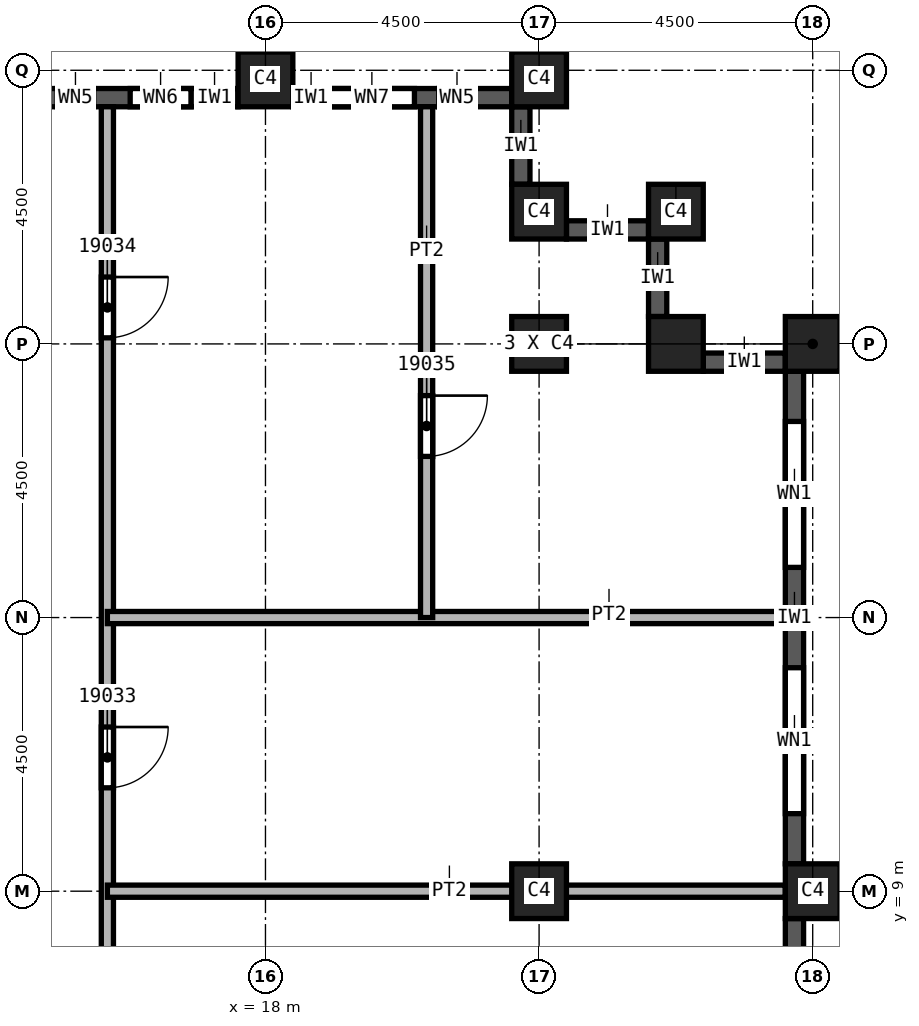
"""IFC4 building model, lengths in metres.
Left out: names, types, materials, properties, quantities, classifications, styles, units other than length and angle.
Written with IfcOpenShell. Run it as: python <this file> out.ifc"""

import sys

from ifc_helpers import new_model, si_unit, direction, frame, frame_2d, origin, origin_2d, place, context, subcontext, project, spatial, rectangle, extrude, element, fill, save


model = new_model("IFC4")
c1 = context("Model", 3, precision=1e-05, world=origin(), true_north=direction((0.0, 1.0)))
c2 = subcontext(c1, "Body", "Model", "MODEL_VIEW")
j1 = project(units=[si_unit("LENGTHUNIT", "METRE"), si_unit("PLANEANGLEUNIT", "RADIAN")], contexts=[c1])
p1 = place(None, origin())
s1 = spatial("IfcSite", under=j1, at=p1, CompositionType="ELEMENT")
p2 = place(p1, origin())
s2 = spatial("IfcBuilding", under=s1, at=p2, CompositionType="ELEMENT")
p3 = place(p2, frame((0.0, 0.0, 282.0)))
s3 = spatial("IfcBuildingStorey", under=s2, at=p3, CompositionType="ELEMENT", Elevation=282.0)
for number, where, z_axis, x_axis in (
    (1, (22.5, 9.0, 0.0), (0.0, 0.0, 1.0), (1.0, 0.0, 0.0)),
    (2, (22.5, 18.0, 0.0), (0.0, 0.0, 1.0), (1.0, 0.0, 0.0)),
    (3, (27.0, 9.0, 0.0), (0.0, 0.0, 1.0), (0.0, 1.0, 0.0)),
    (4, (27.0, 18.0, 0.0), (0.0, 0.0, 1.0), (0.0, 1.0, 0.0)),
    (5, (18.0, 22.35, 0.0), (0.0, 0.0, 1.0), (1.0, 0.0, 0.0)),
    (6, (22.5, 22.35, 0.0), (0.0, 0.0, 1.0), (1.0, 0.0, 0.0)),
    (7, (22.5, 20.175, 0.0), (0.0, 0.0, 1.0), (1.0, 0.0, 0.0)),
    (8, (24.75, 20.175, 0.0), (0.0, 0.0, 1.0), (1.0, 0.0, 0.0)),
    (9, (24.75, 18.0, 0.0), (0.0, 0.0, 1.0), (1.0, 0.0, 0.0)),
):
    element("IfcColumn", number, at=place(p3, frame(where, z_axis=z_axis, x_axis=x_axis)), inside=s3, PredefinedType="COLUMN", context=c2, shape_type="SweptSolid", body=[
        extrude(rectangle(XDim=0.9, YDim=0.9, at=origin_2d()), origin(), (0.0, 0.0, 1.0), 3.72),
    ])
p4 = place(p3, frame((26.7, 0.45, 0.0), z_axis=(0.0, 0.0, 1.0), x_axis=(0.0, 1.0, 0.0)))
e10 = element("IfcWall", 10, at=p4, inside=s3, PredefinedType="SOLIDWALL", context=c2, shape_type="SweptSolid", body=[
    extrude(rectangle(XDim=8.1, YDim=0.3, at=frame_2d((4.05, 0.0))), origin(), (0.0, 0.0, 1.0), 3.12),
])
p5 = place(p4, frame((0.825, 0.0, 0.8)))
e11 = element("IfcOpeningElement", 11, at=p5, cuts=e10, PredefinedType="OPENING", context=c2, shape_type="SweptSolid", body=[
    extrude(rectangle(XDim=2.4, YDim=1.95, at=frame_2d((1.2, 0.975))), frame((0.0, 0.15, 0.0), z_axis=(0.0, -1.0, 0.0), x_axis=(1.0, 0.0, 0.0)), (0.0, 0.0, 1.0), 0.3),
])
p6 = place(p4, frame((4.875, 0.0, 0.8)))
e12 = element("IfcOpeningElement", 12, at=p6, cuts=e10, PredefinedType="OPENING", context=c2, shape_type="SweptSolid", body=[
    extrude(rectangle(XDim=2.4, YDim=1.95, at=frame_2d((1.2, 0.975))), frame((0.0, 0.15, 0.0), z_axis=(0.0, -1.0, 0.0), x_axis=(1.0, 0.0, 0.0)), (0.0, 0.0, 1.0), 0.3),
])
p7 = place(p3, frame((26.7, 9.45, 0.0), z_axis=(0.0, 0.0, 1.0), x_axis=(0.0, 1.0, 0.0)))
e13 = element("IfcWall", 13, at=p7, inside=s3, PredefinedType="SOLIDWALL", context=c2, shape_type="SweptSolid", body=[
    extrude(rectangle(XDim=8.1, YDim=0.3, at=frame_2d((4.05, 0.0))), origin(), (0.0, 0.0, 1.0), 3.12),
])
p8 = place(p7, frame((0.825, 0.0, 0.8)))
e14 = element("IfcOpeningElement", 14, at=p8, cuts=e13, PredefinedType="OPENING", context=c2, shape_type="SweptSolid", body=[
    extrude(rectangle(XDim=2.4, YDim=1.95, at=frame_2d((1.2, 0.975))), frame((0.0, 0.15, 0.0), z_axis=(0.0, -1.0, 0.0), x_axis=(1.0, 0.0, 0.0)), (0.0, 0.0, 1.0), 0.3),
])
p9 = place(p7, frame((4.875, 0.0, 0.8)))
e15 = element("IfcOpeningElement", 15, at=p9, cuts=e13, PredefinedType="OPENING", context=c2, shape_type="SweptSolid", body=[
    extrude(rectangle(XDim=2.4, YDim=1.95, at=frame_2d((1.2, 0.975))), frame((0.0, 0.15, 0.0), z_axis=(0.0, -1.0, 0.0), x_axis=(1.0, 0.0, 0.0)), (0.0, 0.0, 1.0), 0.3),
])
p10 = place(p3, frame((26.55, 17.7, 0.0), z_axis=(0.0, 0.0, 1.0), x_axis=(-1.0, 0.0, 0.0)))
e16 = element("IfcWall", 16, at=p10, inside=s3, PredefinedType="SOLIDWALL", context=c2, shape_type="SweptSolid", body=[
    extrude(rectangle(XDim=1.35, YDim=0.3, at=frame_2d((0.675, 0.0))), origin(), (0.0, 0.0, 1.0), 3.12),
])
p11 = place(p3, frame((24.45, 18.45, 0.0), z_axis=(0.0, 0.0, 1.0), x_axis=(0.0, 1.0, 0.0)))
e17 = element("IfcWall", 17, at=p11, inside=s3, PredefinedType="SOLIDWALL", context=c2, shape_type="SweptSolid", body=[
    extrude(rectangle(XDim=1.275, YDim=0.3, at=frame_2d((0.638, 0.0))), origin(), (0.0, 0.0, 1.0), 3.12),
])
p12 = place(p3, frame((24.3, 19.875, 0.0), z_axis=(0.0, 0.0, 1.0), x_axis=(-1.0, 0.0, 0.0)))
e18 = element("IfcWall", 18, at=p12, inside=s3, PredefinedType="SOLIDWALL", context=c2, shape_type="SweptSolid", body=[
    extrude(rectangle(XDim=1.35, YDim=0.3, at=frame_2d((0.675, 0.0))), origin(), (0.0, 0.0, 1.0), 3.12),
])
p13 = place(p3, frame((22.2, 20.625, 0.0), z_axis=(0.0, 0.0, 1.0), x_axis=(0.0, 1.0, 0.0)))
e19 = element("IfcWall", 19, at=p13, inside=s3, PredefinedType="SOLIDWALL", context=c2, shape_type="SweptSolid", body=[
    extrude(rectangle(XDim=1.275, YDim=0.3, at=frame_2d((0.637, 0.0))), origin(), (0.0, 0.0, 1.0), 3.12),
])
p14 = place(p3, frame((22.05, 22.05, 0.0), z_axis=(0.0, 0.0, 1.0), x_axis=(-1.0, 0.0, 0.0)))
e20 = element("IfcWall", 20, at=p14, inside=s3, PredefinedType="SOLIDWALL", context=c2, shape_type="SweptSolid", body=[
    extrude(rectangle(XDim=3.6, YDim=0.3, at=frame_2d((1.8, 0.0))), origin(), (0.0, 0.0, 1.0), 3.12),
])
p15 = place(p14, frame((0.6, 0.0, 0.8)))
e21 = element("IfcOpeningElement", 21, at=p15, cuts=e20, PredefinedType="OPENING", context=c2, shape_type="SweptSolid", body=[
    extrude(rectangle(XDim=0.6, YDim=1.95, at=frame_2d((0.3, 0.975))), frame((0.0, 0.15, 0.0), z_axis=(0.0, -1.0, 0.0), x_axis=(1.0, 0.0, 0.0)), (0.0, 0.0, 1.0), 0.3),
])
p16 = place(p14, frame((1.6, 0.0, 0.8)))
e22 = element("IfcOpeningElement", 22, at=p16, cuts=e20, PredefinedType="OPENING", context=c2, shape_type="SweptSolid", body=[
    extrude(rectangle(XDim=1.4, YDim=1.95, at=frame_2d((0.7, 0.975))), frame((0.0, 0.15, 0.0), z_axis=(0.0, -1.0, 0.0), x_axis=(1.0, 0.0, 0.0)), (0.0, 0.0, 1.0), 0.3),
])
p17 = place(p3, frame((17.55, 22.05, 0.0), z_axis=(0.0, 0.0, 1.0), x_axis=(-1.0, 0.0, 0.0)))
e23 = element("IfcWall", 23, at=p17, inside=s3, PredefinedType="SOLIDWALL", context=c2, shape_type="SweptSolid", body=[
    extrude(rectangle(XDim=3.6, YDim=0.3, at=frame_2d((1.8, 0.0))), origin(), (0.0, 0.0, 1.0), 3.12),
])
p18 = place(p17, frame((0.775, 0.0, 0.8)))
e24 = element("IfcOpeningElement", 24, at=p18, cuts=e23, PredefinedType="OPENING", context=c2, shape_type="SweptSolid", body=[
    extrude(rectangle(XDim=1.0, YDim=1.95, at=frame_2d((0.5, 0.975))), frame((0.0, 0.15, 0.0), z_axis=(0.0, -1.0, 0.0), x_axis=(1.0, 0.0, 0.0)), (0.0, 0.0, 1.0), 0.3),
])
p19 = place(p17, frame((2.375, 0.0, 0.8)))
e25 = element("IfcOpeningElement", 25, at=p19, cuts=e23, PredefinedType="OPENING", context=c2, shape_type="SweptSolid", body=[
    extrude(rectangle(XDim=0.6, YDim=1.95, at=frame_2d((0.3, 0.975))), frame((0.0, 0.15, 0.0), z_axis=(0.0, -1.0, 0.0), x_axis=(1.0, 0.0, 0.0)), (0.0, 0.0, 1.0), 0.3),
])
p20 = place(p3, frame((15.4, 21.9, 0.0), z_axis=(0.0, 0.0, 1.0), x_axis=(0.0, -1.0, 0.0)))
e26 = element("IfcWall", 26, at=p20, inside=s3, PredefinedType="PARTITIONING", context=c2, shape_type="SweptSolid", body=[
    extrude(rectangle(XDim=43.8, YDim=0.2, at=frame_2d((21.9, 0.0))), origin(), (0.0, 0.0, 1.0), 3.72),
])
p21 = place(p20, frame((17.85, 0.0, 0.0)))
e27 = element("IfcOpeningElement", 27, at=p21, cuts=e26, PredefinedType="OPENING", context=c2, shape_type="SweptSolid", body=[
    extrude(rectangle(XDim=1.0, YDim=2.1, at=frame_2d((0.5, 1.05))), frame((0.0, 0.1, 0.0), z_axis=(0.0, -1.0, 0.0), x_axis=(1.0, 0.0, 0.0)), (0.0, 0.0, 1.0), 0.2),
])
p22 = place(p20, frame((10.2, 0.0, 0.0)))
e28 = element("IfcOpeningElement", 28, at=p22, cuts=e26, PredefinedType="OPENING", context=c2, shape_type="SweptSolid", body=[
    extrude(rectangle(XDim=1.0, YDim=2.1, at=frame_2d((0.5, 1.05))), frame((0.0, 0.1, 0.0), z_axis=(0.0, -1.0, 0.0), x_axis=(1.0, 0.0, 0.0)), (0.0, 0.0, 1.0), 0.2),
])
p23 = place(p20, frame((2.8, 0.0, 0.0)))
e29 = element("IfcOpeningElement", 29, at=p23, cuts=e26, PredefinedType="OPENING", context=c2, shape_type="SweptSolid", body=[
    extrude(rectangle(XDim=1.0, YDim=2.1, at=frame_2d((0.5, 1.05))), frame((0.0, 0.1, 0.0), z_axis=(0.0, -1.0, 0.0), x_axis=(1.0, 0.0, 0.0)), (0.0, 0.0, 1.0), 0.2),
])
p24 = place(p20, frame((34.05, 0.0, 0.0)))
e30 = element("IfcOpeningElement", 30, at=p24, cuts=e26, PredefinedType="OPENING", context=c2, shape_type="SweptSolid", body=[
    extrude(rectangle(XDim=1.0, YDim=2.1, at=frame_2d((0.5, 1.05))), frame((0.0, 0.1, 0.0), z_axis=(0.0, -1.0, 0.0), x_axis=(1.0, 0.0, 0.0)), (0.0, 0.0, 1.0), 0.2),
])
p25 = place(p20, frame((27.75, 0.0, 0.0)))
e31 = element("IfcOpeningElement", 31, at=p25, cuts=e26, PredefinedType="OPENING", context=c2, shape_type="SweptSolid", body=[
    extrude(rectangle(XDim=1.0, YDim=2.1, at=frame_2d((0.5, 1.05))), frame((0.0, 0.1, 0.0), z_axis=(0.0, -1.0, 0.0), x_axis=(1.0, 0.0, 0.0)), (0.0, 0.0, 1.0), 0.2),
])
for number, where, z_axis, x_axis in (
    (32, (15.4, 9.0, 0.0), (0.0, 0.0, 1.0), (1.0, 0.0, 0.0)),
    (33, (15.4, 13.5, 0.0), (0.0, 0.0, 1.0), (1.0, 0.0, 0.0)),
):
    element("IfcWall", number, at=place(p3, frame(where, z_axis=z_axis, x_axis=x_axis)), inside=s3, PredefinedType="PARTITIONING", context=c2, shape_type="SweptSolid", body=[
        extrude(rectangle(XDim=11.15, YDim=0.2, at=frame_2d((5.575, 0.0))), origin(), (0.0, 0.0, 1.0), 3.72),
    ])
p26 = place(p3, frame((20.65, 21.9, 0.0), z_axis=(0.0, 0.0, 1.0), x_axis=(0.0, -1.0, 0.0)))
e34 = element("IfcWall", 34, at=p26, inside=s3, PredefinedType="PARTITIONING", context=c2, shape_type="SweptSolid", body=[
    extrude(rectangle(XDim=8.4, YDim=0.2, at=frame_2d((4.2, 0.0))), origin(), (0.0, 0.0, 1.0), 3.72),
])
p27 = place(p26, frame((4.75, 0.0, 0.0)))
e35 = element("IfcOpeningElement", 35, at=p27, cuts=e34, PredefinedType="OPENING", context=c2, shape_type="SweptSolid", body=[
    extrude(rectangle(XDim=1.0, YDim=2.1, at=frame_2d((0.5, 1.05))), frame((0.0, 0.1, 0.0), z_axis=(0.0, -1.0, 0.0), x_axis=(1.0, 0.0, 0.0)), (0.0, 0.0, 1.0), 0.2),
])
p28 = place(p8, origin())
e36 = element("IfcWindow", 36, at=p28, inside=s3, PartitioningType="SINGLE_PANEL", PredefinedType="WINDOW", context=c2, shape_type="SweptSolid", body=[
    extrude(rectangle(XDim=2.4, YDim=1.95, at=frame_2d((1.2, 0.975))), frame((0.0, 0.03, 0.0), z_axis=(0.0, -1.0, 0.0), x_axis=(1.0, 0.0, 0.0)), (0.0, 0.0, 1.0), 0.06),
])
fill(e14, e36)
p29 = place(p9, origin())
e37 = element("IfcWindow", 37, at=p29, inside=s3, PartitioningType="SINGLE_PANEL", PredefinedType="WINDOW", context=c2, shape_type="SweptSolid", body=[
    extrude(rectangle(XDim=2.4, YDim=1.95, at=frame_2d((1.2, 0.975))), frame((0.0, 0.03, 0.0), z_axis=(0.0, -1.0, 0.0), x_axis=(1.0, 0.0, 0.0)), (0.0, 0.0, 1.0), 0.06),
])
fill(e15, e37)
p30 = place(p22, origin())
e38 = element("IfcDoor", 38, at=p30, inside=s3, OperationType="SINGLE_SWING_RIGHT", PredefinedType="DOOR", context=c2, shape_type="SweptSolid", body=[
    extrude(rectangle(XDim=1.0, YDim=2.1, at=frame_2d((0.5, 1.05))), frame((0.0, 0.025, 0.0), z_axis=(0.0, -1.0, 0.0), x_axis=(1.0, 0.0, 0.0)), (0.0, 0.0, 1.0), 0.05),
])
fill(e28, e38)
p31 = place(p23, origin())
e39 = element("IfcDoor", 39, at=p31, inside=s3, OperationType="SINGLE_SWING_LEFT", PredefinedType="DOOR", context=c2, shape_type="SweptSolid", body=[
    extrude(rectangle(XDim=1.0, YDim=2.1, at=frame_2d((0.5, 1.05))), frame((0.0, 0.025, 0.0), z_axis=(0.0, -1.0, 0.0), x_axis=(1.0, 0.0, 0.0)), (0.0, 0.0, 1.0), 0.05),
])
fill(e29, e39)
p32 = place(p27, origin())
e40 = element("IfcDoor", 40, at=p32, inside=s3, OperationType="SINGLE_SWING_RIGHT", PredefinedType="DOOR", context=c2, shape_type="SweptSolid", body=[
    extrude(rectangle(XDim=1.0, YDim=2.1, at=frame_2d((0.5, 1.05))), frame((0.0, 0.025, 0.0), z_axis=(0.0, -1.0, 0.0), x_axis=(1.0, 0.0, 0.0)), (0.0, 0.0, 1.0), 0.05),
])
fill(e35, e40)
p33 = place(p15, origin())
e41 = element("IfcWindow", 41, at=p33, inside=s3, PartitioningType="SINGLE_PANEL", PredefinedType="WINDOW", context=c2, shape_type="SweptSolid", body=[
    extrude(rectangle(XDim=0.6, YDim=1.95, at=frame_2d((0.3, 0.975))), frame((0.0, 0.03, 0.0), z_axis=(0.0, -1.0, 0.0), x_axis=(1.0, 0.0, 0.0)), (0.0, 0.0, 1.0), 0.06),
])
fill(e21, e41)
p34 = place(p16, origin())
e42 = element("IfcWindow", 42, at=p34, inside=s3, PartitioningType="SINGLE_PANEL", PredefinedType="WINDOW", context=c2, shape_type="SweptSolid", body=[
    extrude(rectangle(XDim=1.4, YDim=1.95, at=frame_2d((0.7, 0.975))), frame((0.0, 0.03, 0.0), z_axis=(0.0, -1.0, 0.0), x_axis=(1.0, 0.0, 0.0)), (0.0, 0.0, 1.0), 0.06),
])
fill(e22, e42)
p35 = place(p18, origin())
e43 = element("IfcWindow", 43, at=p35, inside=s3, PartitioningType="SINGLE_PANEL", PredefinedType="WINDOW", context=c2, shape_type="SweptSolid", body=[
    extrude(rectangle(XDim=1.0, YDim=1.95, at=frame_2d((0.5, 0.975))), frame((0.0, 0.03, 0.0), z_axis=(0.0, -1.0, 0.0), x_axis=(1.0, 0.0, 0.0)), (0.0, 0.0, 1.0), 0.06),
])
fill(e24, e43)
p36 = place(p19, origin())
e44 = element("IfcWindow", 44, at=p36, inside=s3, PartitioningType="SINGLE_PANEL", PredefinedType="WINDOW", context=c2, shape_type="SweptSolid", body=[
    extrude(rectangle(XDim=0.6, YDim=1.95, at=frame_2d((0.3, 0.975))), frame((0.0, 0.03, 0.0), z_axis=(0.0, -1.0, 0.0), x_axis=(1.0, 0.0, 0.0)), (0.0, 0.0, 1.0), 0.06),
])
fill(e25, e44)
save(model, sys.argv[1])
